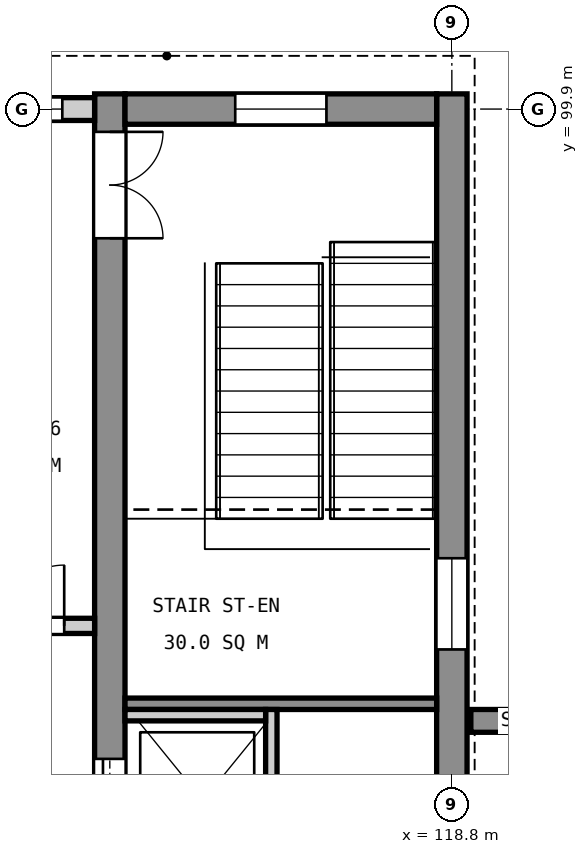
"""IFC4 building model, lengths in metres.
Left out: names, types, materials, properties, quantities, classifications, styles, units other than length and angle.
Written with IfcOpenShell. Run it as: python <this file> out.ifc"""

import sys

from ifc_helpers import new_model, si_unit, direction, frame, frame_2d, origin, place, context, subcontext, project, spatial, rectangle, extrude, element, fill, save


model = new_model("IFC4")
c1 = context("Model", 3, precision=1e-05, world=origin(), true_north=direction((0.0, 1.0)))
c2 = subcontext(c1, "Body", "Model", "MODEL_VIEW")
j1 = project(units=[si_unit("LENGTHUNIT", "METRE"), si_unit("PLANEANGLEUNIT", "RADIAN")], contexts=[c1])
p1 = place(None, origin())
s1 = spatial("IfcSite", under=j1, at=p1, CompositionType="ELEMENT")
p2 = place(p1, origin())
s2 = spatial("IfcBuilding", under=s1, at=p2, CompositionType="ELEMENT")
p3 = place(p2, frame((0.0, 0.0, 41.4)))
s3 = spatial("IfcBuildingStorey", under=s2, at=p3, CompositionType="ELEMENT", Elevation=41.4)
p4 = place(p3, frame((118.8, 88.9, 0.0), z_axis=(0.0, 0.0, 1.0), x_axis=(0.0, 1.0, 0.0)))
e1 = element("IfcWall", 1, at=p4, inside=s3, PredefinedType="SHEAR", context=c2, shape_type="SweptSolid", body=[
    extrude(rectangle(XDim=11.2, YDim=0.4, at=frame_2d((5.6, 0.0))), origin(), (0.0, 0.0, 1.0), 4.55),
])
p5 = place(p4, frame((3.89, 0.0, 3.4)))
e2 = element("IfcOpeningElement", 2, at=p5, cuts=e1, PredefinedType="OPENING", context=c2, shape_type="SweptSolid", body=[
    extrude(rectangle(XDim=1.2, YDim=0.9, at=frame_2d((0.6, 0.45))), frame((0.0, 0.21, 0.0), z_axis=(0.0, -1.0, 0.0), x_axis=(1.0, 0.0, 0.0)), (0.0, 0.0, 1.0), 0.42),
])
p6 = place(p3, frame((114.3, 88.9, 0.0), z_axis=(0.0, 0.0, 1.0), x_axis=(0.0, 1.0, 0.0)))
e3 = element("IfcWall", 3, at=p6, inside=s3, PredefinedType="SHEAR", context=c2, shape_type="SweptSolid", body=[
    extrude(rectangle(XDim=11.2, YDim=0.4, at=frame_2d((5.6, 0.0))), origin(), (0.0, 0.0, 1.0), 4.55),
])
p7 = place(p6, frame((9.3, 0.0, 0.0)))
e4 = element("IfcOpeningElement", 4, at=p7, cuts=e3, PredefinedType="OPENING", context=c2, shape_type="SweptSolid", body=[
    extrude(rectangle(XDim=1.4, YDim=2.1, at=frame_2d((0.7, 1.05))), frame((0.0, 0.21, 0.0), z_axis=(0.0, -1.0, 0.0), x_axis=(1.0, 0.0, 0.0)), (0.0, 0.0, 1.0), 0.42),
])
p8 = place(p6, frame((1.35, 0.0, 0.0)))
e5 = element("IfcOpeningElement", 5, at=p8, cuts=e3, PredefinedType="OPENING", context=c2, shape_type="SweptSolid", body=[
    extrude(rectangle(XDim=1.1, YDim=2.1, at=frame_2d((0.55, 1.05))), frame((0.0, 0.21, 0.0), z_axis=(0.0, -1.0, 0.0), x_axis=(1.0, 0.0, 0.0)), (0.0, 0.0, 1.0), 0.42),
])
p9 = place(p3, frame((118.6, 99.9, 0.0), z_axis=(0.0, 0.0, 1.0), x_axis=(-1.0, 0.0, 0.0)))
e6 = element("IfcWall", 6, at=p9, inside=s3, PredefinedType="SHEAR", context=c2, shape_type="SweptSolid", body=[
    extrude(rectangle(XDim=4.1, YDim=0.4, at=frame_2d((2.05, 0.0))), origin(), (0.0, 0.0, 1.0), 4.55),
])
p10 = place(p9, frame((1.45, 0.0, 3.4)))
e7 = element("IfcOpeningElement", 7, at=p10, cuts=e6, PredefinedType="OPENING", context=c2, shape_type="SweptSolid", body=[
    extrude(rectangle(XDim=1.2, YDim=0.9, at=frame_2d((0.6, 0.45))), frame((0.0, 0.21, 0.0), z_axis=(0.0, -1.0, 0.0), x_axis=(1.0, 0.0, 0.0)), (0.0, 0.0, 1.0), 0.42),
])
p11 = place(p3, frame((119.05, 91.85, 0.0), z_axis=(0.0, 0.0, 1.0), x_axis=(1.0, 0.0, 0.0)))
e8 = element("IfcWall", 8, at=p11, inside=s3, PredefinedType="SHEAR", context=c2, shape_type="SweptSolid", body=[
    extrude(rectangle(XDim=1.25, YDim=0.3, at=frame_2d((0.625, 0.0))), origin(), (0.0, 0.0, 1.0), 4.8),
])
p12 = place(p3, frame((118.6, 92.075, 0.0), z_axis=(0.0, 0.0, 1.0), x_axis=(-1.0, 0.0, 0.0)))
e9 = element("IfcWall", 9, at=p12, inside=s3, PredefinedType="SOLIDWALL", context=c2, shape_type="SweptSolid", body=[
    extrude(rectangle(XDim=4.1, YDim=0.15, at=frame_2d((2.05, 0.0))), origin(), (0.0, 0.0, 1.0), 4.55),
])
p13 = place(p3, frame((116.425, 92.0, 0.0), z_axis=(0.0, 0.0, 1.0), x_axis=(0.0, -1.0, 0.0)))
e10 = element("IfcWall", 10, at=p13, inside=s3, PredefinedType="SOLIDWALL", context=c2, shape_type="SweptSolid", body=[
    extrude(rectangle(XDim=2.7, YDim=0.15, at=frame_2d((1.35, 0.0))), origin(), (0.0, 0.0, 1.0), 4.55),
])
p14 = place(p3, frame((116.35, 91.925, 0.0), z_axis=(0.0, 0.0, 1.0), x_axis=(-1.0, 0.0, 0.0)))
e11 = element("IfcWall", 11, at=p14, inside=s3, PredefinedType="SOLIDWALL", context=c2, shape_type="SweptSolid", body=[
    extrude(rectangle(XDim=1.85, YDim=0.15, at=frame_2d((0.925, 0.0))), origin(), (0.0, 0.0, 1.0), 4.55),
])
p15 = place(p3, frame((114.1, 99.9, 0.0), z_axis=(0.0, 0.0, 1.0), x_axis=(-1.0, 0.0, 0.0)))
e12 = element("IfcWall", 12, at=p15, inside=s3, PredefinedType="STANDARD", context=c2, shape_type="SweptSolid", body=[
    extrude(rectangle(XDim=2.05, YDim=0.3, at=frame_2d((1.025, 0.0))), origin(), (0.0, 0.0, 1.0), 3.85),
])
p16 = place(p15, frame((0.425, 0.0, 0.9)))
e13 = element("IfcOpeningElement", 13, at=p16, cuts=e12, PredefinedType="OPENING", context=c2, shape_type="SweptSolid", body=[
    extrude(rectangle(XDim=1.2, YDim=2.4, at=frame_2d((0.6, 1.2))), frame((0.0, 0.16, 0.0), z_axis=(0.0, -1.0, 0.0), x_axis=(1.0, 0.0, 0.0)), (0.0, 0.0, 1.0), 0.32),
])
p17 = place(p3, frame((114.1, 93.1, 0.0), z_axis=(0.0, 0.0, 1.0), x_axis=(-1.0, 0.0, 0.0)))
e14 = element("IfcWall", 14, at=p17, inside=s3, PredefinedType="PARTITIONING", context=c2, shape_type="SweptSolid", body=[
    extrude(rectangle(XDim=2.35, YDim=0.2, at=frame_2d((1.175, 0.0))), origin(), (0.0, 0.0, 1.0), 3.55),
])
p18 = place(p17, frame((0.4, 0.0, 0.0)))
e15 = element("IfcOpeningElement", 15, at=p18, cuts=e14, PredefinedType="OPENING", context=c2, shape_type="SweptSolid", body=[
    extrude(rectangle(XDim=1.6, YDim=2.1, at=frame_2d((0.8, 1.05))), frame((0.0, 0.11, 0.0), z_axis=(0.0, -1.0, 0.0), x_axis=(1.0, 0.0, 0.0)), (0.0, 0.0, 1.0), 0.22),
])
p19 = place(p7, frame((1.4, 0.0, 0.0), z_axis=(0.0, 0.0, 1.0), x_axis=(-1.0, 0.0, 0.0)))
e16 = element("IfcDoor", 16, at=p19, inside=s3, OperationType="DOUBLE_DOOR_SINGLE_SWING", PredefinedType="DOOR", context=c2, shape_type="SweptSolid", body=[
    extrude(rectangle(XDim=1.4, YDim=2.1, at=frame_2d((0.7, 1.05))), frame((0.0, 0.025, 0.0), z_axis=(0.0, -1.0, 0.0), x_axis=(1.0, 0.0, 0.0)), (0.0, 0.0, 1.0), 0.05),
])
fill(e4, e16)
p20 = place(p8, origin())
e17 = element("IfcDoor", 17, at=p20, inside=s3, OperationType="SLIDING_TO_LEFT", PredefinedType="DOOR", context=c2, shape_type="SweptSolid", body=[
    extrude(rectangle(XDim=1.1, YDim=2.1, at=frame_2d((0.55, 1.05))), frame((0.0, 0.025, 0.0), z_axis=(0.0, -1.0, 0.0), x_axis=(1.0, 0.0, 0.0)), (0.0, 0.0, 1.0), 0.05),
])
fill(e5, e17)
p21 = place(p16, origin())
e18 = element("IfcWindow", 18, at=p21, inside=s3, PartitioningType="SINGLE_PANEL", PredefinedType="WINDOW", context=c2, shape_type="SweptSolid", body=[
    extrude(rectangle(XDim=1.2, YDim=2.4, at=frame_2d((0.6, 1.2))), frame((0.0, 0.03, 0.0), z_axis=(0.0, -1.0, 0.0), x_axis=(1.0, 0.0, 0.0)), (0.0, 0.0, 1.0), 0.06),
])
fill(e13, e18)
p22 = place(p5, origin())
e19 = element("IfcWindow", 19, at=p22, inside=s3, PartitioningType="SINGLE_PANEL", PredefinedType="WINDOW", context=c2, shape_type="SweptSolid", body=[
    extrude(rectangle(XDim=1.2, YDim=0.9, at=frame_2d((0.6, 0.45))), frame((0.0, 0.03, 0.0), z_axis=(0.0, -1.0, 0.0), x_axis=(1.0, 0.0, 0.0)), (0.0, 0.0, 1.0), 0.06),
])
fill(e2, e19)
p23 = place(p10, origin())
e20 = element("IfcWindow", 20, at=p23, inside=s3, PartitioningType="SINGLE_PANEL", PredefinedType="WINDOW", context=c2, shape_type="SweptSolid", body=[
    extrude(rectangle(XDim=1.2, YDim=0.9, at=frame_2d((0.6, 0.45))), frame((0.0, 0.03, 0.0), z_axis=(0.0, -1.0, 0.0), x_axis=(1.0, 0.0, 0.0)), (0.0, 0.0, 1.0), 0.06),
])
fill(e7, e20)
p24 = place(p18, frame((1.6, 0.0, 0.0), z_axis=(0.0, 0.0, 1.0), x_axis=(-1.0, 0.0, 0.0)))
e21 = element("IfcDoor", 21, at=p24, inside=s3, OperationType="DOUBLE_DOOR_SINGLE_SWING", PredefinedType="DOOR", context=c2, shape_type="SweptSolid", body=[
    extrude(rectangle(XDim=1.6, YDim=2.1, at=frame_2d((0.8, 1.05))), frame((0.0, 0.025, 0.0), z_axis=(0.0, -1.0, 0.0), x_axis=(1.0, 0.0, 0.0)), (0.0, 0.0, 1.0), 0.05),
])
fill(e15, e21)
save(model, sys.argv[1])
